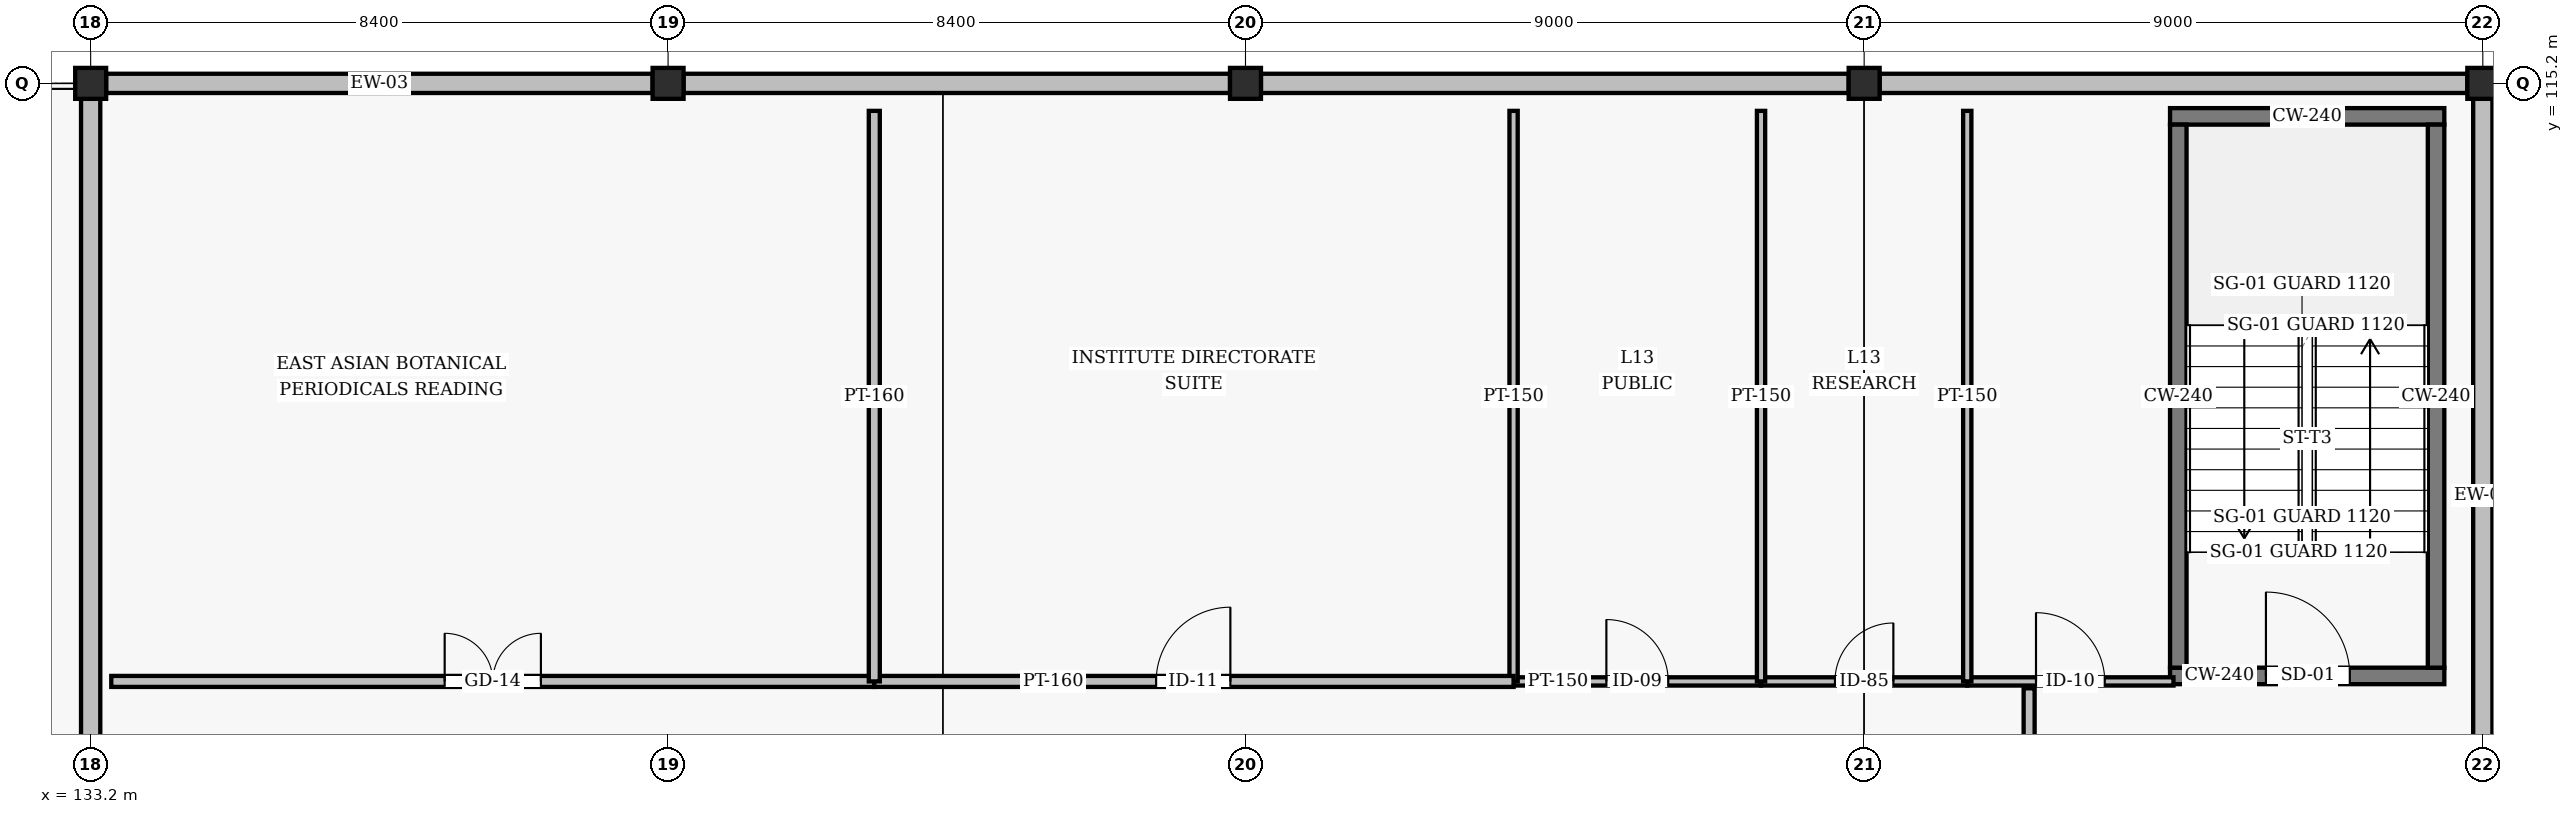
"""IFC4 building model, lengths in metres.
Left out: names, types, materials, properties, quantities, classifications, styles, units other than length and angle.
Written with IfcOpenShell. Run it as: python <this file> out.ifc"""

import sys

from ifc_helpers import new_model, si_unit, direction, frame, frame_2d, origin, origin_2d, place, context, subcontext, project, spatial, rectangle, hollow_rectangle, extrude, element, fill, save


model = new_model("IFC4")
c1 = context("Model", 3, precision=1e-05, world=origin(), true_north=direction((0.0, 1.0)))
c2 = subcontext(c1, "Body", "Model", "MODEL_VIEW")
j1 = project(units=[si_unit("LENGTHUNIT", "METRE"), si_unit("PLANEANGLEUNIT", "RADIAN")], contexts=[c1])
p1 = place(None, origin())
s1 = spatial("IfcSite", under=j1, at=p1, CompositionType="ELEMENT")
p2 = place(p1, origin())
s2 = spatial("IfcBuilding", under=s1, at=p2, CompositionType="ELEMENT")
p3 = place(p2, frame((0.0, 0.0, 50.4)))
s3 = spatial("IfcBuildingStorey", under=s2, at=p3, CompositionType="ELEMENT", Elevation=50.4)
for number, where, z_axis, x_axis in (
    (1, (133.2, 115.2, 0.0), (0.0, 0.0, 1.0), (1.0, 0.0, 0.0)),
    (2, (141.6, 115.2, 0.0), (0.0, 0.0, 1.0), (1.0, 0.0, 0.0)),
    (3, (150.0, 115.2, 0.0), (0.0, 0.0, 1.0), (1.0, 0.0, 0.0)),
    (4, (159.0, 115.2, 0.0), (0.0, 0.0, 1.0), (1.0, 0.0, 0.0)),
    (5, (168.0, 115.2, 0.0), (0.0, 0.0, 1.0), (1.0, 0.0, 0.0)),
):
    element("IfcColumn", number, at=place(p3, frame(where, z_axis=z_axis, x_axis=x_axis)), inside=s3, PredefinedType="COLUMN", context=c2, shape_type="SweptSolid", body=[
        extrude(hollow_rectangle(XDim=0.45, YDim=0.45, WallThickness=0.018, InnerFilletRadius=0.018, OuterFilletRadius=0.036, at=origin_2d()), origin(), (0.0, 0.0, 1.0), 3.6),
    ])
p4 = place(p3, frame((168.0, 103.425, 0.0), z_axis=(0.0, 0.0, 1.0), x_axis=(0.0, 1.0, 0.0)))
e6 = element("IfcWall", 6, at=p4, inside=s3, PredefinedType="SOLIDWALL", context=c2, shape_type="SweptSolid", body=[
    extrude(rectangle(XDim=11.55, YDim=0.28, at=frame_2d((5.775, 0.0))), origin(), (0.0, 0.0, 1.0), 2.554),
])
for number, where, z_axis, x_axis in (
    (7, (167.775, 115.2, 0.0), (0.0, 0.0, 1.0), (-1.0, 0.0, 0.0)),
    (8, (158.775, 115.2, 0.0), (0.0, 0.0, 1.0), (-1.0, 0.0, 0.0)),
):
    element("IfcWall", number, at=place(p3, frame(where, z_axis=z_axis, x_axis=x_axis)), inside=s3, PredefinedType="SOLIDWALL", context=c2, shape_type="SweptSolid", body=[
        extrude(rectangle(XDim=8.55, YDim=0.28, at=frame_2d((4.275, 0.0))), origin(), (0.0, 0.0, 1.0), 2.554),
    ])
for number, where, z_axis, x_axis in (
    (9, (149.775, 115.2, 0.0), (0.0, 0.0, 1.0), (-1.0, 0.0, 0.0)),
    (10, (141.375, 115.2, 0.0), (0.0, 0.0, 1.0), (-1.0, 0.0, 0.0)),
):
    element("IfcWall", number, at=place(p3, frame(where, z_axis=z_axis, x_axis=x_axis)), inside=s3, PredefinedType="SOLIDWALL", context=c2, shape_type="SweptSolid", body=[
        extrude(rectangle(XDim=7.95, YDim=0.28, at=frame_2d((3.975, 0.0))), origin(), (0.0, 0.0, 1.0), 2.846),
    ])
p5 = place(p3, frame((133.2, 114.975, 0.0), z_axis=(0.0, 0.0, 1.0), x_axis=(0.0, -1.0, 0.0)))
e11 = element("IfcWall", 11, at=p5, inside=s3, PredefinedType="SOLIDWALL", context=c2, shape_type="SweptSolid", body=[
    extrude(rectangle(XDim=11.55, YDim=0.28, at=frame_2d((5.775, 0.0))), origin(), (0.0, 0.0, 1.0), 2.554),
])
p6 = place(p3, frame((163.45, 106.58, 0.0), z_axis=(0.0, 0.0, 1.0), x_axis=(1.0, 0.0, 0.0)))
e12 = element("IfcWall", 12, at=p6, inside=s3, PredefinedType="SHEAR", context=c2, shape_type="SweptSolid", body=[
    extrude(rectangle(XDim=3.99, YDim=0.24, at=frame_2d((1.995, 0.0))), origin(), (0.0, 0.0, 1.0), 3.346),
])
p7 = place(p6, frame((1.395, 0.0, 0.0)))
e13 = element("IfcOpeningElement", 13, at=p7, cuts=e12, PredefinedType="OPENING", context=c2, shape_type="SweptSolid", body=[
    extrude(rectangle(XDim=1.22, YDim=2.18, at=frame_2d((0.61, 1.09))), frame((0.0, 0.13, 0.0), z_axis=(0.0, -1.0, 0.0), x_axis=(1.0, 0.0, 0.0)), (0.0, 0.0, 1.0), 0.26),
])
p8 = place(p3, frame((163.45, 114.72, 0.0), z_axis=(0.0, 0.0, 1.0), x_axis=(1.0, 0.0, 0.0)))
e14 = element("IfcWall", 14, at=p8, inside=s3, PredefinedType="SHEAR", context=c2, shape_type="SweptSolid", body=[
    extrude(rectangle(XDim=3.99, YDim=0.24, at=frame_2d((1.995, 0.0))), origin(), (0.0, 0.0, 1.0), 3.346),
])
for number, where, z_axis, x_axis in (
    (15, (163.57, 106.7, 0.0), (0.0, 0.0, 1.0), (0.0, 1.0, 0.0)),
    (16, (167.32, 106.7, 0.0), (0.0, 0.0, 1.0), (0.0, 1.0, 0.0)),
):
    element("IfcWall", number, at=place(p3, frame(where, z_axis=z_axis, x_axis=x_axis)), inside=s3, PredefinedType="SHEAR", context=c2, shape_type="SweptSolid", body=[
        extrude(rectangle(XDim=7.9, YDim=0.24, at=frame_2d((3.95, 0.0))), origin(), (0.0, 0.0, 1.0), 3.346),
    ])
p9 = place(p3, frame((153.9, 106.5, 0.0), z_axis=(0.0, 0.0, 1.0), x_axis=(1.0, 0.0, 0.0)))
e17 = element("IfcWall", 17, at=p9, inside=s3, PredefinedType="PARTITIONING", context=c2, shape_type="SweptSolid", body=[
    extrude(rectangle(XDim=3.6, YDim=0.12, at=frame_2d((1.8, 0.0))), origin(), (0.0, 0.0, 1.0), 3.346),
])
p10 = place(p9, frame((1.35, 0.0, 0.0)))
e18 = element("IfcOpeningElement", 18, at=p10, cuts=e17, PredefinedType="OPENING", context=c2, shape_type="SweptSolid", body=[
    extrude(rectangle(XDim=0.9, YDim=2.1, at=frame_2d((0.45, 1.05))), frame((0.0, 0.07, 0.0), z_axis=(0.0, -1.0, 0.0), x_axis=(1.0, 0.0, 0.0)), (0.0, 0.0, 1.0), 0.14),
])
p11 = place(p3, frame((157.5, 106.5, 0.0), z_axis=(0.0, 0.0, 1.0), x_axis=(1.0, 0.0, 0.0)))
e19 = element("IfcWall", 19, at=p11, inside=s3, PredefinedType="PARTITIONING", context=c2, shape_type="SweptSolid", body=[
    extrude(rectangle(XDim=3.0, YDim=0.12, at=frame_2d((1.5, 0.0))), origin(), (0.0, 0.0, 1.0), 2.646),
])
p12 = place(p11, frame((1.075, 0.0, 0.0)))
e20 = element("IfcOpeningElement", 20, at=p12, cuts=e19, PredefinedType="OPENING", context=c2, shape_type="SweptSolid", body=[
    extrude(rectangle(XDim=0.85, YDim=2.1, at=frame_2d((0.425, 1.05))), frame((0.0, 0.07, 0.0), z_axis=(0.0, -1.0, 0.0), x_axis=(1.0, 0.0, 0.0)), (0.0, 0.0, 1.0), 0.14),
])
p13 = place(p3, frame((160.5, 106.5, 0.0), z_axis=(0.0, 0.0, 1.0), x_axis=(1.0, 0.0, 0.0)))
e21 = element("IfcWall", 21, at=p13, inside=s3, PredefinedType="PARTITIONING", context=c2, shape_type="SweptSolid", body=[
    extrude(rectangle(XDim=3.0, YDim=0.12, at=frame_2d((1.5, 0.0))), origin(), (0.0, 0.0, 1.0), 3.346),
])
p14 = place(p13, frame((1.0, 0.0, 0.0)))
e22 = element("IfcOpeningElement", 22, at=p14, cuts=e21, PredefinedType="OPENING", context=c2, shape_type="SweptSolid", body=[
    extrude(rectangle(XDim=1.0, YDim=2.1, at=frame_2d((0.5, 1.05))), frame((0.0, 0.07, 0.0), z_axis=(0.0, -1.0, 0.0), x_axis=(1.0, 0.0, 0.0)), (0.0, 0.0, 1.0), 0.14),
])
for number, where, z_axis, x_axis in (
    (23, (153.9, 106.5, 0.0), (0.0, 0.0, 1.0), (0.0, 1.0, 0.0)),
    (24, (157.5, 106.5, 0.0), (0.0, 0.0, 1.0), (0.0, 1.0, 0.0)),
):
    element("IfcWall", number, at=place(p3, frame(where, z_axis=z_axis, x_axis=x_axis)), inside=s3, PredefinedType="PARTITIONING", context=c2, shape_type="SweptSolid", body=[
        extrude(rectangle(XDim=8.3, YDim=0.12, at=frame_2d((4.15, 0.0))), origin(), (0.0, 0.0, 1.0), 2.95),
    ])
p15 = place(p3, frame((160.5, 106.5, 0.0), z_axis=(0.0, 0.0, 1.0), x_axis=(0.0, 1.0, 0.0)))
e25 = element("IfcWall", 25, at=p15, inside=s3, PredefinedType="PARTITIONING", context=c2, shape_type="SweptSolid", body=[
    extrude(rectangle(XDim=8.3, YDim=0.12, at=frame_2d((4.15, 0.0))), origin(), (0.0, 0.0, 1.0), 3.346),
])
p16 = place(p3, frame((161.4, 92.3, 0.0), z_axis=(0.0, 0.0, 1.0), x_axis=(0.0, 1.0, 0.0)))
e26 = element("IfcWall", 26, at=p16, inside=s3, PredefinedType="PARTITIONING", context=c2, shape_type="SweptSolid", body=[
    extrude(rectangle(XDim=14.1, YDim=0.16, at=frame_2d((7.05, 0.0))), origin(), (0.0, 0.0, 1.0), 2.75),
])
p17 = place(p16, frame((6.5, 0.0, 0.0)))
e27 = element("IfcOpeningElement", 27, at=p17, cuts=e26, PredefinedType="OPENING", context=c2, shape_type="SweptSolid", body=[
    extrude(rectangle(XDim=1.08, YDim=2.08, at=frame_2d((0.54, 1.04))), frame((0.0, 0.09, 0.0), z_axis=(0.0, -1.0, 0.0), x_axis=(1.0, 0.0, 0.0)), (0.0, 0.0, 1.0), 0.18),
])
p18 = place(p3, frame((133.5, 106.5, 0.0), z_axis=(0.0, 0.0, 1.0), x_axis=(1.0, 0.0, 0.0)))
e28 = element("IfcWall", 28, at=p18, inside=s3, PredefinedType="PARTITIONING", context=c2, shape_type="SweptSolid", body=[
    extrude(rectangle(XDim=11.1, YDim=0.16, at=frame_2d((5.55, 0.0))), origin(), (0.0, 0.0, 1.0), 2.646),
])
p19 = place(p18, frame((4.85, 0.0, 0.0)))
e29 = element("IfcOpeningElement", 29, at=p19, cuts=e28, PredefinedType="OPENING", context=c2, shape_type="SweptSolid", body=[
    extrude(rectangle(XDim=1.4, YDim=2.1, at=frame_2d((0.7, 1.05))), frame((0.0, 0.09, 0.0), z_axis=(0.0, -1.0, 0.0), x_axis=(1.0, 0.0, 0.0)), (0.0, 0.0, 1.0), 0.18),
])
p20 = place(p3, frame((144.6, 106.5, 0.0), z_axis=(0.0, 0.0, 1.0), x_axis=(1.0, 0.0, 0.0)))
e30 = element("IfcWall", 30, at=p20, inside=s3, PredefinedType="PARTITIONING", context=c2, shape_type="SweptSolid", body=[
    extrude(rectangle(XDim=9.3, YDim=0.16, at=frame_2d((4.65, 0.0))), origin(), (0.0, 0.0, 1.0), 2.646),
])
p21 = place(p20, frame((4.1, 0.0, 0.0)))
e31 = element("IfcOpeningElement", 31, at=p21, cuts=e30, PredefinedType="OPENING", context=c2, shape_type="SweptSolid", body=[
    extrude(rectangle(XDim=1.08, YDim=2.08, at=frame_2d((0.54, 1.04))), frame((0.0, 0.09, 0.0), z_axis=(0.0, -1.0, 0.0), x_axis=(1.0, 0.0, 0.0)), (0.0, 0.0, 1.0), 0.18),
])
p22 = place(p3, frame((144.6, 106.5, 0.0), z_axis=(0.0, 0.0, 1.0), x_axis=(0.0, 1.0, 0.0)))
e32 = element("IfcWall", 32, at=p22, inside=s3, PredefinedType="PARTITIONING", context=c2, shape_type="SweptSolid", body=[
    extrude(rectangle(XDim=8.3, YDim=0.16, at=frame_2d((4.15, 0.0))), origin(), (0.0, 0.0, 1.0), 3.0),
])
p23 = place(p7, origin())
e33 = element("IfcDoor", 33, at=p23, inside=s3, OperationType="SINGLE_SWING_LEFT", PredefinedType="DOOR", context=c2, shape_type="SweptSolid", body=[
    extrude(rectangle(XDim=1.22, YDim=2.18, at=frame_2d((0.61, 1.09))), frame((0.0, 0.025, 0.0), z_axis=(0.0, -1.0, 0.0), x_axis=(1.0, 0.0, 0.0)), (0.0, 0.0, 1.0), 0.05),
])
fill(e13, e33)
p24 = place(p10, origin())
e34 = element("IfcDoor", 34, at=p24, inside=s3, OperationType="SINGLE_SWING_LEFT", PredefinedType="DOOR", context=c2, shape_type="SweptSolid", body=[
    extrude(rectangle(XDim=0.9, YDim=2.1, at=frame_2d((0.45, 1.05))), frame((0.0, 0.025, 0.0), z_axis=(0.0, -1.0, 0.0), x_axis=(1.0, 0.0, 0.0)), (0.0, 0.0, 1.0), 0.05),
])
fill(e18, e34)
p25 = place(p12, origin())
e35 = element("IfcDoor", 35, at=p25, inside=s3, OperationType="SINGLE_SWING_RIGHT", PredefinedType="DOOR", context=c2, shape_type="SweptSolid", body=[
    extrude(rectangle(XDim=0.85, YDim=2.1, at=frame_2d((0.425, 1.05))), frame((0.0, 0.025, 0.0), z_axis=(0.0, -1.0, 0.0), x_axis=(1.0, 0.0, 0.0)), (0.0, 0.0, 1.0), 0.05),
])
fill(e20, e35)
p26 = place(p14, origin())
e36 = element("IfcDoor", 36, at=p26, inside=s3, OperationType="SINGLE_SWING_LEFT", PredefinedType="DOOR", context=c2, shape_type="SweptSolid", body=[
    extrude(rectangle(XDim=1.0, YDim=2.1, at=frame_2d((0.5, 1.05))), frame((0.0, 0.025, 0.0), z_axis=(0.0, -1.0, 0.0), x_axis=(1.0, 0.0, 0.0)), (0.0, 0.0, 1.0), 0.05),
])
fill(e22, e36)
p27 = place(p19, origin())
e37 = element("IfcDoor", 37, at=p27, inside=s3, OperationType="DOUBLE_DOOR_SINGLE_SWING", PredefinedType="DOOR", context=c2, shape_type="SweptSolid", body=[
    extrude(rectangle(XDim=1.4, YDim=2.1, at=frame_2d((0.7, 1.05))), frame((0.0, 0.025, 0.0), z_axis=(0.0, -1.0, 0.0), x_axis=(1.0, 0.0, 0.0)), (0.0, 0.0, 1.0), 0.05),
])
fill(e29, e37)
p28 = place(p21, origin())
e38 = element("IfcDoor", 38, at=p28, inside=s3, OperationType="SINGLE_SWING_RIGHT", PredefinedType="DOOR", context=c2, shape_type="SweptSolid", body=[
    extrude(rectangle(XDim=1.08, YDim=2.08, at=frame_2d((0.54, 1.04))), frame((0.0, 0.025, 0.0), z_axis=(0.0, -1.0, 0.0), x_axis=(1.0, 0.0, 0.0)), (0.0, 0.0, 1.0), 0.05),
])
fill(e31, e38)
save(model, sys.argv[1])
